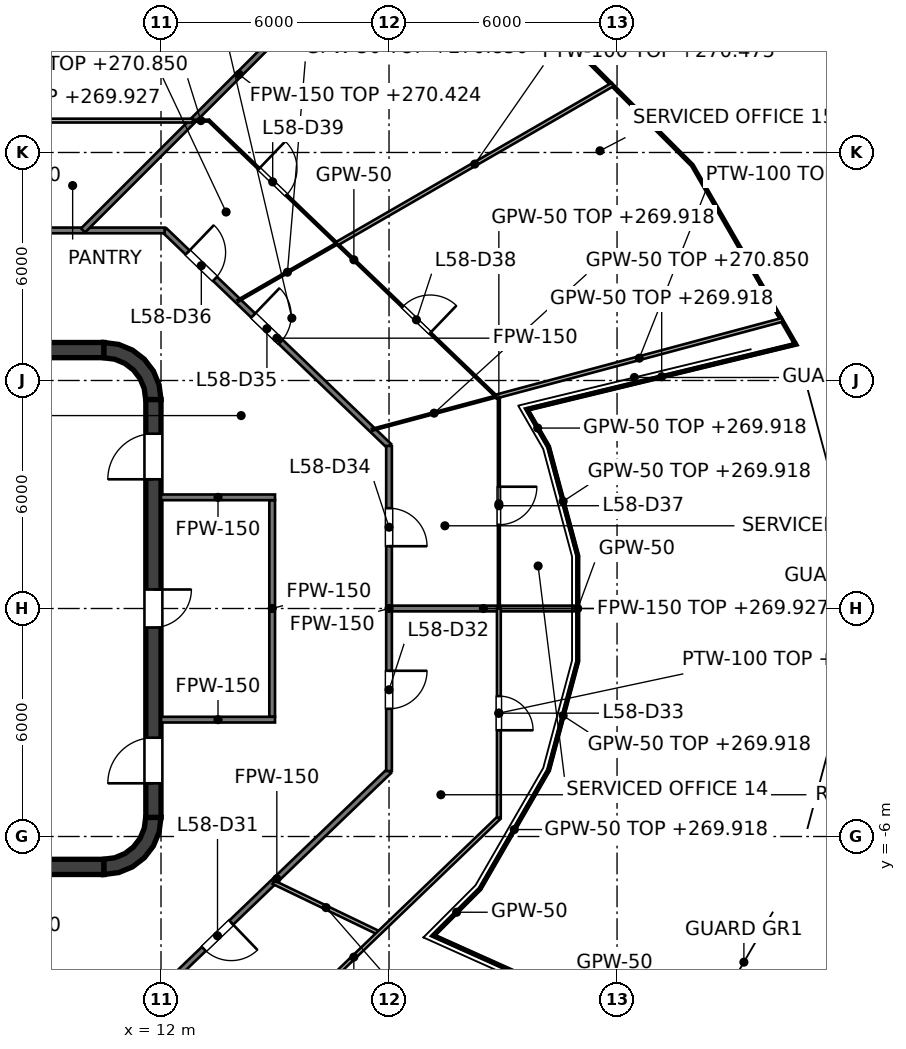
"""IFC4 building model, lengths in metres.
Left out: names, types, materials, properties, quantities, classifications, styles, units other than length and angle.
Written with IfcOpenShell. Run it as: python <this file> out.ifc"""

import sys

from ifc_helpers import new_model, si_unit, direction, frame, frame_2d, origin, place, context, subcontext, project, spatial, polyline, rectangle, outline, extrude, element, fill, save


model = new_model("IFC4")
c1 = context("Model", 3, precision=1e-05, world=origin(), true_north=direction((0.0, 1.0)))
c2 = subcontext(c1, "Body", "Model", "MODEL_VIEW")
j1 = project(units=[si_unit("LENGTHUNIT", "METRE"), si_unit("PLANEANGLEUNIT", "RADIAN")], contexts=[c1])
p1 = place(None, origin())
s1 = spatial("IfcSite", under=j1, at=p1, CompositionType="ELEMENT")
p2 = place(p1, origin())
s2 = spatial("IfcBuilding", under=s1, at=p2, CompositionType="ELEMENT")
p3 = place(p2, frame((0.0, 0.0, 267.0)))
s3 = spatial("IfcBuildingStorey", under=s2, at=p3, CompositionType="ELEMENT", Elevation=267.0)
for number, where, z_axis, x_axis in (
    (1, (-10.5, 6.8, 0.0), (0.0, 0.0, 1.0), (1.0, 0.0, 0.0)),
    (2, (-10.5, -6.8, 0.0), (0.0, 0.0, 1.0), (1.0, 0.0, 0.0)),
):
    element("IfcWall", number, at=place(p3, frame(where, z_axis=z_axis, x_axis=x_axis)), inside=s3, PredefinedType="SHEAR", context=c2, shape_type="SweptSolid", body=[
        extrude(rectangle(XDim=21.0, YDim=0.4, at=frame_2d((10.5, 0.0))), origin(), (0.0, 0.0, 1.0), 4.0),
    ])
p4 = place(p3, frame((11.8, -5.5, 0.0), z_axis=(0.0, 0.0, 1.0), x_axis=(0.0, 1.0, 0.0)))
e3 = element("IfcWall", 3, at=p4, inside=s3, PredefinedType="SHEAR", context=c2, shape_type="SweptSolid", body=[
    extrude(rectangle(XDim=11.0, YDim=0.4, at=frame_2d((5.5, 0.0))), origin(), (0.0, 0.0, 1.0), 4.0),
])
p5 = place(p4, frame((5.0, 0.0, 0.0)))
e4 = element("IfcOpeningElement", 4, at=p5, cuts=e3, PredefinedType="OPENING", context=c2, shape_type="SweptSolid", body=[
    extrude(rectangle(XDim=1.0, YDim=2.1, at=frame_2d((0.5, 1.05))), frame((0.0, 0.2, 0.0), z_axis=(0.0, -1.0, 0.0), x_axis=(1.0, 0.0, 0.0)), (0.0, 0.0, 1.0), 0.4),
])
p6 = place(p4, frame((0.9, 0.0, 0.0)))
e5 = element("IfcOpeningElement", 5, at=p6, cuts=e3, PredefinedType="OPENING", context=c2, shape_type="SweptSolid", body=[
    extrude(rectangle(XDim=1.2, YDim=2.1, at=frame_2d((0.6, 1.05))), frame((0.0, 0.2, 0.0), z_axis=(0.0, -1.0, 0.0), x_axis=(1.0, 0.0, 0.0)), (0.0, 0.0, 1.0), 0.4),
])
p7 = place(p4, frame((8.9, 0.0, 0.0)))
e6 = element("IfcOpeningElement", 6, at=p7, cuts=e3, PredefinedType="OPENING", context=c2, shape_type="SweptSolid", body=[
    extrude(rectangle(XDim=1.2, YDim=2.1, at=frame_2d((0.6, 1.05))), frame((0.0, 0.2, 0.0), z_axis=(0.0, -1.0, 0.0), x_axis=(1.0, 0.0, 0.0)), (0.0, 0.0, 1.0), 0.4),
])
p8 = place(p3, origin())
e7 = element("IfcWall", 7, at=p8, inside=s3, PredefinedType="SHEAR", context=c2, shape_type="SweptSolid", body=[
    extrude(outline(polyline([(10.5, 7.0), (10.5, 6.596), (10.784, 6.559), (11.048, 6.45), (11.275, 6.275), (11.45, 6.048), (11.559, 5.784), (11.596, 5.5), (12.0, 5.5), (11.949, 5.888), (11.799, 6.25), (11.561, 6.561), (11.25, 6.799), (10.888, 6.949), (10.5, 7.0)])), origin(), (0.0, 0.0, 1.0), 4.0),
])
e8 = element("IfcWall", 8, at=p8, inside=s3, PredefinedType="SHEAR", context=c2, shape_type="SweptSolid", body=[
    extrude(outline(polyline([(12.0, -5.5), (11.596, -5.5), (11.559, -5.784), (11.45, -6.048), (11.275, -6.275), (11.048, -6.45), (10.784, -6.559), (10.5, -6.596), (10.5, -7.0), (10.888, -6.949), (11.25, -6.799), (11.561, -6.561), (11.799, -6.25), (11.949, -5.888), (12.0, -5.5)])), origin(), (0.0, 0.0, 1.0), 4.0),
])
p9 = place(p3, frame((14.925, -2.85, 0.0), z_axis=(0.0, 0.0, 1.0), x_axis=(0.0, 1.0, 0.0)))
e9 = element("IfcWall", 9, at=p9, inside=s3, PredefinedType="PARTITIONING", context=c2, shape_type="SweptSolid", body=[
    extrude(rectangle(XDim=5.7, YDim=0.15, at=frame_2d((2.85, 0.0))), origin(), (0.0, 0.0, 1.0), 2.918),
])
for number, where, z_axis, x_axis in (
    (10, (12.0, 2.925, 0.0), (0.0, 0.0, 1.0), (1.0, 0.0, 0.0)),
    (11, (12.0, -2.925, 0.0), (0.0, 0.0, 1.0), (1.0, 0.0, 0.0)),
):
    element("IfcWall", number, at=place(p3, frame(where, z_axis=z_axis, x_axis=x_axis)), inside=s3, PredefinedType="PARTITIONING", context=c2, shape_type="SweptSolid", body=[
        extrude(rectangle(XDim=3.0, YDim=0.15, at=frame_2d((1.5, 0.0))), origin(), (0.0, 0.0, 1.0), 2.918),
    ])
p10 = place(p3, frame((12.095, 9.949, 0.0), z_axis=(0.0, 0.0, 1.0), x_axis=(0.721290181137, -0.692633001376, 0.0)))
e12 = element("IfcWall", 12, at=p10, inside=s3, PredefinedType="PARTITIONING", context=c2, shape_type="SweptSolid", body=[
    extrude(rectangle(XDim=8.187, YDim=0.15, at=frame_2d((4.094, 0.0))), origin(), (0.0, 0.0, 1.0), 2.918),
])
p11 = place(p10, frame((3.232, 0.0, 0.0)))
e13 = element("IfcOpeningElement", 13, at=p11, cuts=e12, PredefinedType="OPENING", context=c2, shape_type="SweptSolid", body=[
    extrude(rectangle(XDim=1.0, YDim=2.1, at=frame_2d((0.5, 1.05))), frame((0.0, 0.075, 0.0), z_axis=(0.0, -1.0, 0.0), x_axis=(1.0, 0.0, 0.0)), (0.0, 0.0, 1.0), 0.15),
])
p12 = place(p10, frame((0.839, 0.0, 0.0)))
e14 = element("IfcOpeningElement", 14, at=p12, cuts=e12, PredefinedType="OPENING", context=c2, shape_type="SweptSolid", body=[
    extrude(rectangle(XDim=1.0, YDim=2.1, at=frame_2d((0.5, 1.05))), frame((0.0, 0.075, 0.0), z_axis=(0.0, -1.0, 0.0), x_axis=(1.0, 0.0, 0.0)), (0.0, 0.0, 1.0), 0.15),
])
p13 = place(p3, frame((18.0, 0.0, 0.0), z_axis=(0.0, 0.0, 1.0), x_axis=(1.0, 0.0, 0.0)))
e15 = element("IfcWall", 15, at=p13, inside=s3, PredefinedType="PARTITIONING", context=c2, shape_type="SweptSolid", body=[
    extrude(rectangle(XDim=4.966, YDim=0.15, at=frame_2d((2.483, 0.0))), origin(), (0.0, 0.0, 1.0), 2.927),
])
p14 = place(p3, frame((-12.095, 9.949, 0.0), z_axis=(0.0, 0.0, 1.0), x_axis=(1.0, 0.0, 0.0)))
e16 = element("IfcWall", 16, at=p14, inside=s3, PredefinedType="PARTITIONING", context=c2, shape_type="SweptSolid", body=[
    extrude(rectangle(XDim=24.19, YDim=0.15, at=frame_2d((12.095, 0.0))), origin(), (0.0, 0.0, 1.0), 2.927),
])
p15 = place(p14, frame((9.784, 0.0, 0.0)))
e17 = element("IfcOpeningElement", 17, at=p15, cuts=e16, PredefinedType="OPENING", context=c2, shape_type="SweptSolid", body=[
    extrude(rectangle(XDim=1.0, YDim=2.1, at=frame_2d((0.5, 1.05))), frame((0.0, 0.075, 0.0), z_axis=(0.0, -1.0, 0.0), x_axis=(1.0, 0.0, 0.0)), (0.0, 0.0, 1.0), 0.15),
])
p16 = place(p14, frame((5.56, 0.0, 0.0)))
e18 = element("IfcOpeningElement", 18, at=p16, cuts=e16, PredefinedType="OPENING", context=c2, shape_type="SweptSolid", body=[
    extrude(rectangle(XDim=1.0, YDim=2.1, at=frame_2d((0.5, 1.05))), frame((0.0, 0.075, 0.0), z_axis=(0.0, -1.0, 0.0), x_axis=(1.0, 0.0, 0.0)), (0.0, 0.0, 1.0), 0.15),
])
p17 = place(p14, frame((1.322, 0.0, 0.0)))
e19 = element("IfcOpeningElement", 19, at=p17, cuts=e16, PredefinedType="OPENING", context=c2, shape_type="SweptSolid", body=[
    extrude(rectangle(XDim=1.0, YDim=2.1, at=frame_2d((0.5, 1.05))), frame((0.0, 0.075, 0.0), z_axis=(0.0, -1.0, 0.0), x_axis=(1.0, 0.0, 0.0)), (0.0, 0.0, 1.0), 0.15),
])
p18 = place(p14, frame((19.104, 0.0, 0.0)))
e20 = element("IfcOpeningElement", 20, at=p18, cuts=e16, PredefinedType="OPENING", context=c2, shape_type="SweptSolid", body=[
    extrude(rectangle(XDim=1.0, YDim=2.1, at=frame_2d((0.5, 1.05))), frame((0.0, 0.075, 0.0), z_axis=(0.0, -1.0, 0.0), x_axis=(1.0, 0.0, 0.0)), (0.0, 0.0, 1.0), 0.15),
])
p19 = place(p14, frame((14.129, 0.0, 0.0)))
e21 = element("IfcOpeningElement", 21, at=p19, cuts=e16, PredefinedType="OPENING", context=c2, shape_type="SweptSolid", body=[
    extrude(rectangle(XDim=1.0, YDim=2.1, at=frame_2d((0.5, 1.05))), frame((0.0, 0.075, 0.0), z_axis=(0.0, -1.0, 0.0), x_axis=(1.0, 0.0, 0.0)), (0.0, 0.0, 1.0), 0.15),
])
p20 = place(p3, frame((12.095, -9.949, 0.0), z_axis=(0.0, 0.0, 1.0), x_axis=(0.721260976692, 0.69266341285, 0.0)))
e22 = element("IfcWall", 22, at=p20, inside=s3, PredefinedType="PARTITIONING", context=c2, shape_type="SweptSolid", body=[
    extrude(rectangle(XDim=8.187, YDim=0.15, at=frame_2d((4.094, 0.0))), origin(), (0.0, 0.0, 1.0), 2.918),
])
p21 = place(p20, frame((1.43, 0.0, 0.0)))
e23 = element("IfcOpeningElement", 23, at=p21, cuts=e22, PredefinedType="OPENING", context=c2, shape_type="SweptSolid", body=[
    extrude(rectangle(XDim=1.0, YDim=2.1, at=frame_2d((0.5, 1.05))), frame((0.0, 0.075, 0.0), z_axis=(0.0, -1.0, 0.0), x_axis=(1.0, 0.0, 0.0)), (0.0, 0.0, 1.0), 0.15),
])
p22 = place(p3, frame((9.949, 9.949, 0.0), z_axis=(0.0, 0.0, 1.0), x_axis=(0.707106781187, 0.707106781187, 0.0)))
e24 = element("IfcWall", 24, at=p22, inside=s3, PredefinedType="PARTITIONING", context=c2, shape_type="SweptSolid", body=[
    extrude(rectangle(XDim=11.612, YDim=0.15, at=frame_2d((5.806, 0.0))), origin(), (0.0, 0.0, 1.0), 3.424),
])
p23 = place(p3, frame((18.0, -4.278, 0.0), z_axis=(0.0, 0.0, 1.0), x_axis=(0.0, 1.0, 0.0)))
e25 = element("IfcWall", 25, at=p23, inside=s3, PredefinedType="PARTITIONING", context=c2, shape_type="SweptSolid", body=[
    extrude(rectangle(XDim=8.556, YDim=0.15, at=frame_2d((4.278, 0.0))), origin(), (0.0, 0.0, 1.0), 2.918),
])
p24 = place(p23, frame((1.639, 0.0, 0.0)))
e26 = element("IfcOpeningElement", 26, at=p24, cuts=e25, PredefinedType="OPENING", context=c2, shape_type="SweptSolid", body=[
    extrude(rectangle(XDim=1.0, YDim=2.1, at=frame_2d((0.5, 1.05))), frame((0.0, 0.075, 0.0), z_axis=(0.0, -1.0, 0.0), x_axis=(1.0, 0.0, 0.0)), (0.0, 0.0, 1.0), 0.15),
])
p25 = place(p23, frame((5.917, 0.0, 0.0)))
e27 = element("IfcOpeningElement", 27, at=p25, cuts=e25, PredefinedType="OPENING", context=c2, shape_type="SweptSolid", body=[
    extrude(rectangle(XDim=1.0, YDim=2.1, at=frame_2d((0.5, 1.05))), frame((0.0, 0.075, 0.0), z_axis=(0.0, -1.0, 0.0), x_axis=(1.0, 0.0, 0.0)), (0.0, 0.0, 1.0), 0.15),
])
p26 = place(p3, frame((22.197, 4.256, 0.0), z_axis=(0.0, 0.0, 1.0), x_axis=(0.258736085224, -0.965948051503, 0.0)))
e28 = element("IfcWall", 28, at=p26, inside=s3, PredefinedType="PARTITIONING", context=c2, shape_type="SweptSolid", body=[
    extrude(rectangle(XDim=2.972, YDim=0.05, at=frame_2d((1.486, 0.0))), origin(), (0.0, 0.0, 1.0), 2.918),
])
p27 = place(p3, frame((21.629, 5.24, 0.0), z_axis=(0.0, 0.0, 1.0), x_axis=(0.500044870432, -0.865999496279, 0.0)))
e29 = element("IfcWall", 29, at=p27, inside=s3, PredefinedType="PARTITIONING", context=c2, shape_type="SweptSolid", body=[
    extrude(rectangle(XDim=1.136, YDim=0.05, at=frame_2d((0.568, 0.0))), origin(), (0.0, 0.0, 1.0), 2.918),
])
p28 = place(p3, frame((13.258, 12.839, 0.0), z_axis=(0.0, 0.0, 1.0), x_axis=(0.721469843217, -0.692445857327, 0.0)))
e30 = element("IfcWall", 30, at=p28, inside=s3, PredefinedType="PARTITIONING", context=c2, shape_type="SweptSolid", body=[
    extrude(rectangle(XDim=10.582, YDim=0.05, at=frame_2d((5.291, 0.0))), origin(), (0.0, 0.0, 1.0), 2.927),
])
p29 = place(p28, frame((7.072, 0.0, 0.0)))
e31 = element("IfcOpeningElement", 31, at=p29, cuts=e30, PredefinedType="OPENING", context=c2, shape_type="SweptSolid", body=[
    extrude(rectangle(XDim=1.0, YDim=2.1, at=frame_2d((0.5, 1.05))), frame((0.0, 0.025, 0.0), z_axis=(0.0, -1.0, 0.0), x_axis=(1.0, 0.0, 0.0)), (0.0, 0.0, 1.0), 0.05),
])
p30 = place(p28, frame((1.83, 0.0, 0.0)))
e32 = element("IfcOpeningElement", 32, at=p30, cuts=e30, PredefinedType="OPENING", context=c2, shape_type="SweptSolid", body=[
    extrude(rectangle(XDim=1.0, YDim=2.1, at=frame_2d((0.5, 1.05))), frame((0.0, 0.025, 0.0), z_axis=(0.0, -1.0, 0.0), x_axis=(1.0, 0.0, 0.0)), (0.0, 0.0, 1.0), 0.05),
])
p31 = place(p3, frame((19.164, -8.608, 0.0), z_axis=(0.0, 0.0, 1.0), x_axis=(0.912165340302, -0.409822390741, 0.0)))
e33 = element("IfcWall", 33, at=p31, inside=s3, PredefinedType="PARTITIONING", context=c2, shape_type="SweptSolid", body=[
    extrude(rectangle(XDim=7.489, YDim=0.05, at=frame_2d((3.744, 0.0))), origin(), (0.0, 0.0, 1.0), 2.927),
])
p32 = place(p3, frame((12.839, 12.839, 0.0), z_axis=(0.0, 0.0, 1.0), x_axis=(1.0, 0.0, 0.0)))
e34 = element("IfcWall", 34, at=p32, inside=s3, PredefinedType="PARTITIONING", context=c2, shape_type="SweptSolid", body=[
    extrude(rectangle(XDim=0.419, YDim=0.05, at=frame_2d((0.209, 0.0))), origin(), (0.0, 0.0, 1.0), 3.85),
])
p33 = place(p3, frame((21.629, 5.24, 0.0), z_axis=(0.0, 0.0, 1.0), x_axis=(0.971882367971, 0.235466903888, 0.0)))
e35 = element("IfcWall", 35, at=p33, inside=s3, PredefinedType="PARTITIONING", context=c2, shape_type="SweptSolid", body=[
    extrude(rectangle(XDim=7.296, YDim=0.05, at=frame_2d((3.648, 0.0))), origin(), (0.0, 0.0, 1.0), 2.918),
])
p34 = place(p3, frame((17.556, 4.704, 0.0), z_axis=(0.0, 0.0, 1.0), x_axis=(0.965949987261, 0.258728858285, 0.0)))
e36 = element("IfcWall", 36, at=p34, inside=s3, PredefinedType="PARTITIONING", context=c2, shape_type="SweptSolid", body=[
    extrude(rectangle(XDim=3.377, YDim=0.05, at=frame_2d((1.688, 0.0))), origin(), (0.0, 0.0, 1.0), 3.85),
])
p35 = place(p3, frame((14.024, 8.097, 0.0), z_axis=(0.0, 0.0, 1.0), x_axis=(0.86600176378, 0.500040943453, 0.0)))
e37 = element("IfcWall", 37, at=p35, inside=s3, PredefinedType="PARTITIONING", context=c2, shape_type="SweptSolid", body=[
    extrude(rectangle(XDim=3.008, YDim=0.05, at=frame_2d((1.504, 0.0))), origin(), (0.0, 0.0, 1.0), 3.85),
])
p36 = place(p3, frame((19.164, -8.608, 0.0), z_axis=(0.0, 0.0, 1.0), x_axis=(0.707106781187, 0.707106781187, 0.0)))
e38 = element("IfcWall", 38, at=p36, inside=s3, PredefinedType="PARTITIONING", context=c2, shape_type="SweptSolid", body=[
    extrude(rectangle(XDim=1.74, YDim=0.05, at=frame_2d((0.87, 0.0))), origin(), (0.0, 0.0, 1.0), 2.927),
])
p37 = place(p3, frame((20.394, -7.378, 0.0), z_axis=(0.0, 0.0, 1.0), x_axis=(0.500123016475, 0.865954368539, 0.0)))
e39 = element("IfcWall", 39, at=p37, inside=s3, PredefinedType="PARTITIONING", context=c2, shape_type="SweptSolid", body=[
    extrude(rectangle(XDim=3.605, YDim=0.05, at=frame_2d((1.802, 0.0))), origin(), (0.0, 0.0, 1.0), 2.918),
])
p38 = place(p3, frame((22.197, -4.256, 0.0), z_axis=(0.0, 0.0, 1.0), x_axis=(0.258736085224, 0.965948051503, 0.0)))
e40 = element("IfcWall", 40, at=p38, inside=s3, PredefinedType="PARTITIONING", context=c2, shape_type="SweptSolid", body=[
    extrude(rectangle(XDim=2.972, YDim=0.05, at=frame_2d((1.486, 0.0))), origin(), (0.0, 0.0, 1.0), 2.918),
])
p39 = place(p3, frame((22.966, -1.385, 0.0), z_axis=(0.0, 0.0, 1.0), x_axis=(0.0, 1.0, 0.0)))
e41 = element("IfcWall", 41, at=p39, inside=s3, PredefinedType="PARTITIONING", context=c2, shape_type="SweptSolid", body=[
    extrude(rectangle(XDim=2.77, YDim=0.05, at=frame_2d((1.385, 0.0))), origin(), (0.0, 0.0, 1.0), 2.927),
])
p40 = place(p3, frame((20.89, 0.0, 0.0), z_axis=(0.0, 0.0, 1.0), x_axis=(0.0, 1.0, 0.0)))
e42 = element("IfcWall", 42, at=p40, inside=s3, PredefinedType="PARTITIONING", context=c2, shape_type="SweptSolid", body=[
    extrude(rectangle(XDim=5.509, YDim=0.05, at=frame_2d((2.754, 0.0))), origin(), (0.0, 0.0, 1.0), 2.918),
])
p41 = place(p40, frame((2.204, 0.0, 0.0)))
e43 = element("IfcOpeningElement", 43, at=p41, cuts=e42, PredefinedType="OPENING", context=c2, shape_type="SweptSolid", body=[
    extrude(rectangle(XDim=1.0, YDim=2.1, at=frame_2d((0.5, 1.05))), frame((0.0, 0.025, 0.0), z_axis=(0.0, -1.0, 0.0), x_axis=(1.0, 0.0, 0.0)), (0.0, 0.0, 1.0), 0.05),
])
p42 = place(p3, frame((14.955, -7.202, 0.0), z_axis=(0.0, 0.0, 1.0), x_axis=(0.900977603602, -0.433865598783, 0.0)))
e44 = element("IfcWall", 44, at=p42, inside=s3, PredefinedType="PARTITIONING", context=c2, shape_type="SweptSolid", body=[
    extrude(rectangle(XDim=3.084, YDim=0.1, at=frame_2d((1.542, 0.0))), origin(), (0.0, 0.0, 1.0), 3.85),
])
p43 = place(p3, frame((0.0, 12.839, 0.0), z_axis=(0.0, 0.0, 1.0), x_axis=(1.0, 0.0, 0.0)))
e45 = element("IfcWall", 45, at=p43, inside=s3, PredefinedType="PARTITIONING", context=c2, shape_type="SweptSolid", body=[
    extrude(rectangle(XDim=12.839, YDim=0.1, at=frame_2d((6.419, 0.0))), origin(), (0.0, 0.0, 1.0), 2.927),
])
p44 = place(p43, frame((2.32, 0.0, 0.0)))
e46 = element("IfcOpeningElement", 46, at=p44, cuts=e45, PredefinedType="OPENING", context=c2, shape_type="SweptSolid", body=[
    extrude(rectangle(XDim=1.8, YDim=2.1, at=frame_2d((0.9, 1.05))), frame((0.0, 0.05, 0.0), z_axis=(0.0, -1.0, 0.0), x_axis=(1.0, 0.0, 0.0)), (0.0, 0.0, 1.0), 0.1),
])
p45 = place(p3, frame((20.818, 5.578, 0.0), z_axis=(0.0, 0.0, 1.0), x_axis=(0.96590682433, 0.258889950971, 0.0)))
e47 = element("IfcWall", 47, at=p45, inside=s3, PredefinedType="PARTITIONING", context=c2, shape_type="SweptSolid", body=[
    extrude(rectangle(XDim=7.799, YDim=0.1, at=frame_2d((3.899, 0.0))), origin(), (0.0, 0.0, 1.0), 3.527),
])
p46 = place(p3, frame((16.629, 9.601, 0.0), z_axis=(0.0, 0.0, 1.0), x_axis=(0.866035608203, 0.499982325013, 0.0)))
e48 = element("IfcWall", 48, at=p46, inside=s3, PredefinedType="PARTITIONING", context=c2, shape_type="SweptSolid", body=[
    extrude(rectangle(XDim=8.376, YDim=0.1, at=frame_2d((4.188, 0.0))), origin(), (0.0, 0.0, 1.0), 3.475),
])
p47 = place(p3, frame((13.258, -12.839, 0.0), z_axis=(0.0, 0.0, 1.0), x_axis=(0.721209796007, 0.692716702659, 0.0)))
e49 = element("IfcWall", 49, at=p47, inside=s3, PredefinedType="PARTITIONING", context=c2, shape_type="SweptSolid", body=[
    extrude(rectangle(XDim=10.582, YDim=0.1, at=frame_2d((5.291, 0.0))), origin(), (0.0, 0.0, 1.0), 2.927),
])
p48 = place(p3, frame((20.89, -5.509, 0.0), z_axis=(0.0, 0.0, 1.0), x_axis=(0.0, 1.0, 0.0)))
e50 = element("IfcWall", 50, at=p48, inside=s3, PredefinedType="PARTITIONING", context=c2, shape_type="SweptSolid", body=[
    extrude(rectangle(XDim=5.509, YDim=0.1, at=frame_2d((2.754, 0.0))), origin(), (0.0, 0.0, 1.0), 2.918),
])
p49 = place(p48, frame((2.304, 0.0, 0.0)))
e51 = element("IfcOpeningElement", 51, at=p49, cuts=e50, PredefinedType="OPENING", context=c2, shape_type="SweptSolid", body=[
    extrude(rectangle(XDim=0.9, YDim=2.1, at=frame_2d((0.45, 1.05))), frame((0.0, 0.05, 0.0), z_axis=(0.0, -1.0, 0.0), x_axis=(1.0, 0.0, 0.0)), (0.0, 0.0, 1.0), 0.1),
])
p50 = place(p5, origin())
e52 = element("IfcDoor", 52, at=p50, inside=s3, OperationType="SINGLE_SWING_RIGHT", PredefinedType="DOOR", context=c2, shape_type="SweptSolid", body=[
    extrude(rectangle(XDim=1.0, YDim=2.1, at=frame_2d((0.5, 1.05))), frame((0.0, 0.025, 0.0), z_axis=(0.0, -1.0, 0.0), x_axis=(1.0, 0.0, 0.0)), (0.0, 0.0, 1.0), 0.05),
])
fill(e4, e52)
p51 = place(p6, origin())
e53 = element("IfcDoor", 53, at=p51, inside=s3, OperationType="SINGLE_SWING_LEFT", PredefinedType="DOOR", context=c2, shape_type="SweptSolid", body=[
    extrude(rectangle(XDim=1.2, YDim=2.1, at=frame_2d((0.6, 1.05))), frame((0.0, 0.025, 0.0), z_axis=(0.0, -1.0, 0.0), x_axis=(1.0, 0.0, 0.0)), (0.0, 0.0, 1.0), 0.05),
])
fill(e5, e53)
p52 = place(p7, origin())
e54 = element("IfcDoor", 54, at=p52, inside=s3, OperationType="SINGLE_SWING_LEFT", PredefinedType="DOOR", context=c2, shape_type="SweptSolid", body=[
    extrude(rectangle(XDim=1.2, YDim=2.1, at=frame_2d((0.6, 1.05))), frame((0.0, 0.025, 0.0), z_axis=(0.0, -1.0, 0.0), x_axis=(1.0, 0.0, 0.0)), (0.0, 0.0, 1.0), 0.05),
])
fill(e6, e54)
p53 = place(p21, origin())
e55 = element("IfcDoor", 55, at=p53, inside=s3, OperationType="SINGLE_SWING_RIGHT", PredefinedType="DOOR", context=c2, shape_type="SweptSolid", body=[
    extrude(rectangle(XDim=1.0, YDim=2.1, at=frame_2d((0.5, 1.05))), frame((0.0, 0.025, 0.0), z_axis=(0.0, -1.0, 0.0), x_axis=(1.0, 0.0, 0.0)), (0.0, 0.0, 1.0), 0.05),
])
fill(e23, e55)
p54 = place(p24, origin())
e56 = element("IfcDoor", 56, at=p54, inside=s3, OperationType="SINGLE_SWING_RIGHT", PredefinedType="DOOR", context=c2, shape_type="SweptSolid", body=[
    extrude(rectangle(XDim=1.0, YDim=2.1, at=frame_2d((0.5, 1.05))), frame((0.0, 0.025, 0.0), z_axis=(0.0, -1.0, 0.0), x_axis=(1.0, 0.0, 0.0)), (0.0, 0.0, 1.0), 0.05),
])
fill(e26, e56)
p55 = place(p49, origin())
e57 = element("IfcDoor", 57, at=p55, inside=s3, OperationType="SINGLE_SWING_LEFT", PredefinedType="DOOR", context=c2, shape_type="SweptSolid", body=[
    extrude(rectangle(XDim=0.9, YDim=2.1, at=frame_2d((0.45, 1.05))), frame((0.0, 0.025, 0.0), z_axis=(0.0, -1.0, 0.0), x_axis=(1.0, 0.0, 0.0)), (0.0, 0.0, 1.0), 0.05),
])
fill(e51, e57)
p56 = place(p25, origin())
e58 = element("IfcDoor", 58, at=p56, inside=s3, OperationType="SINGLE_SWING_LEFT", PredefinedType="DOOR", context=c2, shape_type="SweptSolid", body=[
    extrude(rectangle(XDim=1.0, YDim=2.1, at=frame_2d((0.5, 1.05))), frame((0.0, 0.025, 0.0), z_axis=(0.0, -1.0, 0.0), x_axis=(1.0, 0.0, 0.0)), (0.0, 0.0, 1.0), 0.05),
])
fill(e27, e58)
p57 = place(p11, origin())
e59 = element("IfcDoor", 59, at=p57, inside=s3, OperationType="SINGLE_SWING_LEFT", PredefinedType="DOOR", context=c2, shape_type="SweptSolid", body=[
    extrude(rectangle(XDim=1.0, YDim=2.1, at=frame_2d((0.5, 1.05))), frame((0.0, 0.025, 0.0), z_axis=(0.0, -1.0, 0.0), x_axis=(1.0, 0.0, 0.0)), (0.0, 0.0, 1.0), 0.05),
])
fill(e13, e59)
p58 = place(p12, origin())
e60 = element("IfcDoor", 60, at=p58, inside=s3, OperationType="SINGLE_SWING_LEFT", PredefinedType="DOOR", context=c2, shape_type="SweptSolid", body=[
    extrude(rectangle(XDim=1.0, YDim=2.1, at=frame_2d((0.5, 1.05))), frame((0.0, 0.025, 0.0), z_axis=(0.0, -1.0, 0.0), x_axis=(1.0, 0.0, 0.0)), (0.0, 0.0, 1.0), 0.05),
])
fill(e14, e60)
p59 = place(p41, origin())
e61 = element("IfcDoor", 61, at=p59, inside=s3, OperationType="SINGLE_SWING_RIGHT", PredefinedType="DOOR", context=c2, shape_type="SweptSolid", body=[
    extrude(rectangle(XDim=1.0, YDim=2.1, at=frame_2d((0.5, 1.05))), frame((0.0, 0.025, 0.0), z_axis=(0.0, -1.0, 0.0), x_axis=(1.0, 0.0, 0.0)), (0.0, 0.0, 1.0), 0.05),
])
fill(e43, e61)
p60 = place(p29, origin())
e62 = element("IfcDoor", 62, at=p60, inside=s3, OperationType="SINGLE_SWING_RIGHT", PredefinedType="DOOR", context=c2, shape_type="SweptSolid", body=[
    extrude(rectangle(XDim=1.0, YDim=2.1, at=frame_2d((0.5, 1.05))), frame((0.0, 0.025, 0.0), z_axis=(0.0, -1.0, 0.0), x_axis=(1.0, 0.0, 0.0)), (0.0, 0.0, 1.0), 0.05),
])
fill(e31, e62)
p61 = place(p30, origin())
e63 = element("IfcDoor", 63, at=p61, inside=s3, OperationType="SINGLE_SWING_LEFT", PredefinedType="DOOR", context=c2, shape_type="SweptSolid", body=[
    extrude(rectangle(XDim=1.0, YDim=2.1, at=frame_2d((0.5, 1.05))), frame((0.0, 0.025, 0.0), z_axis=(0.0, -1.0, 0.0), x_axis=(1.0, 0.0, 0.0)), (0.0, 0.0, 1.0), 0.05),
])
fill(e32, e63)
save(model, sys.argv[1])
